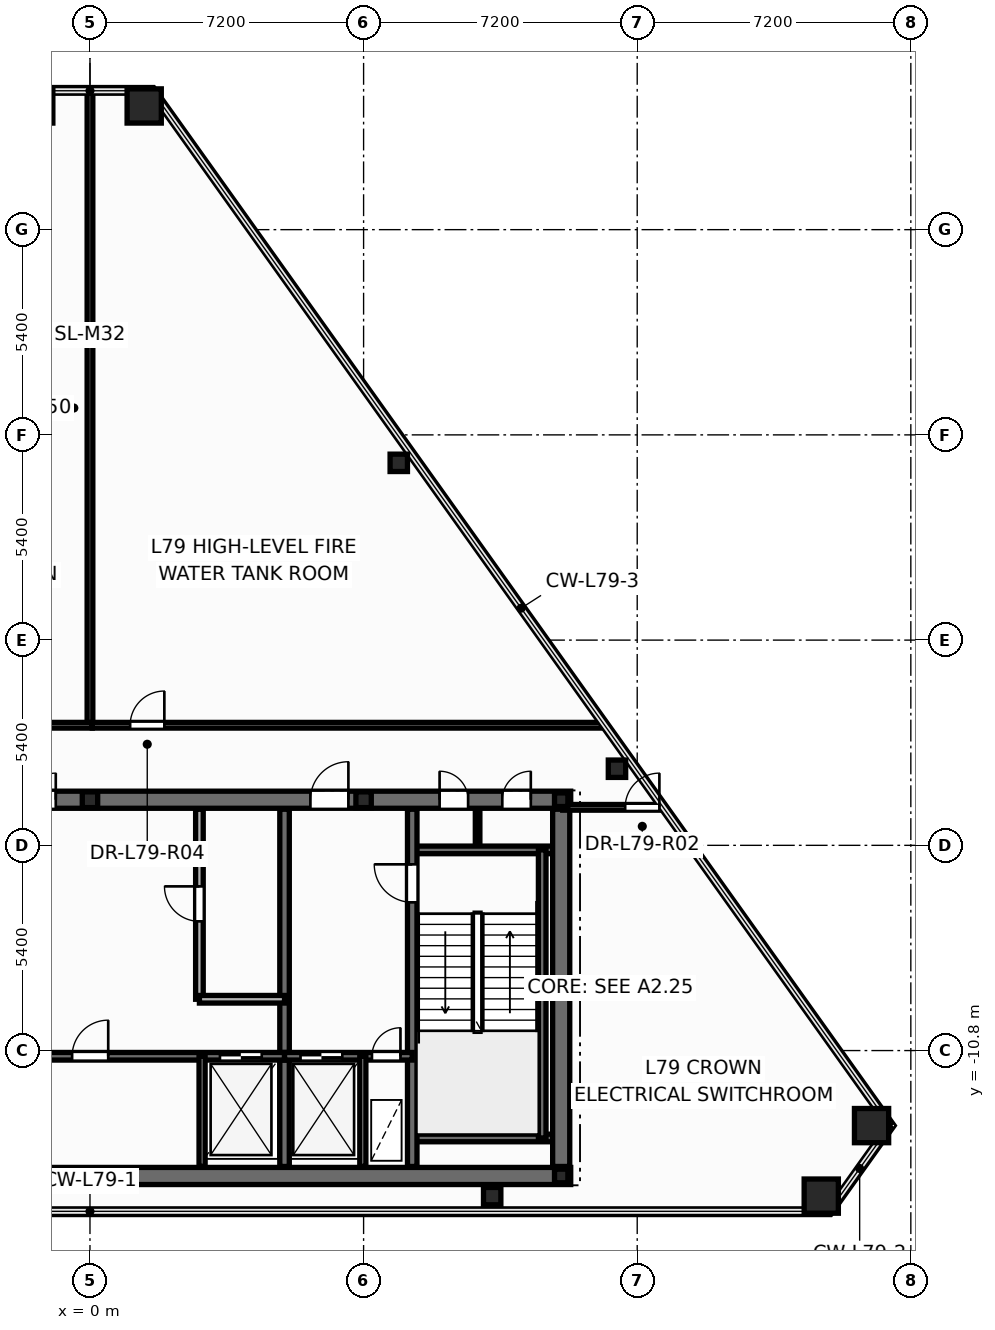
"""IFC4 building model, lengths in metres.
Left out: names, types, materials, properties, quantities, classifications, styles, units other than length and angle.
Written with IfcOpenShell. Run it as: python <this file> out.ifc"""

import sys

from ifc_helpers import new_model, si_unit, direction, frame, frame_2d, origin, origin_2d, place, context, subcontext, project, spatial, rectangle, hollow_rectangle, hollow_circle, i_section, extrude, element, fill, save


model = new_model("IFC4")
c1 = context("Model", 3, precision=1e-05, world=origin(), true_north=direction((0.0, 1.0)))
c2 = subcontext(c1, "Body", "Model", "MODEL_VIEW")
j1 = project(units=[si_unit("LENGTHUNIT", "METRE"), si_unit("PLANEANGLEUNIT", "RADIAN")], contexts=[c1])
p1 = place(None, origin())
s1 = spatial("IfcSite", under=j1, at=p1, CompositionType="ELEMENT")
p2 = place(p1, origin())
s2 = spatial("IfcBuilding", under=s1, at=p2, CompositionType="ELEMENT")
p3 = place(p2, frame((0.0, 0.0, 301.8)))
s3 = spatial("IfcBuildingStorey", under=s2, at=p3, CompositionType="ELEMENT", Elevation=301.8)
for number, where, z_axis, x_axis in (
    (1, (19.243, -14.63, 0.0), (0.0, 0.0, 1.0), (1.0, 0.0, 0.0)),
    (2, (20.567, -12.775, 0.0), (0.0, 0.0, 1.0), (1.0, 0.0, 0.0)),
    (3, (1.427, 14.055, 0.0), (0.0, 0.0, 1.0), (1.0, 0.0, 0.0)),
    (4, (-1.427, 14.055, 0.0), (0.0, 0.0, 1.0), (1.0, 0.0, 0.0)),
):
    element("IfcColumn", number, at=place(p3, frame(where, z_axis=z_axis, x_axis=x_axis)), inside=s3, PredefinedType="COLUMN", context=c2, shape_type="SweptSolid", body=[
        extrude(hollow_rectangle(XDim=0.9, YDim=0.9, WallThickness=0.04, at=origin_2d()), origin(), (0.0, 0.0, 1.0), 4.2),
    ])
for number, where, z_axis, x_axis in (
    (5, (10.583, -14.63, 0.0), (0.0, 0.0, 1.0), (1.0, 0.0, 0.0)),
    (6, (13.868, -3.385, 0.0), (0.0, 0.0, 1.0), (1.0, 0.0, 0.0)),
    (7, (8.126, 4.664, 0.0), (0.0, 0.0, 1.0), (1.0, 0.0, 0.0)),
):
    element("IfcColumn", number, at=place(p3, frame(where, z_axis=z_axis, x_axis=x_axis)), inside=s3, PredefinedType="COLUMN", context=c2, shape_type="SweptSolid", body=[
        extrude(hollow_circle(Radius=0.229, WallThickness=0.016, at=origin_2d()), origin(), (0.0, 0.0, 1.0), 4.2),
    ])
for number, where, z_axis, x_axis in (
    (8, (12.4, -14.1, 0.0), (0.0, 0.0, 1.0), (1.0, 0.0, 0.0)),
    (9, (12.4, -4.2, 0.0), (0.0, 0.0, 1.0), (1.0, 0.0, 0.0)),
):
    element("IfcColumn", number, at=place(p3, frame(where, z_axis=z_axis, x_axis=x_axis)), inside=s3, PredefinedType="COLUMN", context=c2, shape_type="SweptSolid", body=[
        extrude(i_section(OverallWidth=0.352, OverallDepth=0.359, WebThickness=0.018, FlangeThickness=0.026, at=origin_2d()), origin(), (0.0, 0.0, 1.0), 4.2),
    ])
for number, where, z_axis, x_axis in (
    (10, (0.0, -4.2, 0.0), (0.0, 0.0, 1.0), (1.0, 0.0, 0.0)),
    (11, (7.2, -4.2, 0.0), (0.0, 0.0, 1.0), (1.0, 0.0, 0.0)),
):
    element("IfcColumn", number, at=place(p3, frame(where, z_axis=z_axis, x_axis=x_axis)), inside=s3, PredefinedType="PILASTER", context=c2, shape_type="SweptSolid", body=[
        extrude(i_section(OverallWidth=0.405, OverallDepth=0.414, WebThickness=0.022, FlangeThickness=0.032, at=origin_2d()), origin(), (0.0, 0.0, 1.0), 4.2),
    ])
p4 = place(p3, frame((10.2, -5.52, 0.0), z_axis=(0.0, 0.0, 1.0), x_axis=(0.0, 1.0, 0.0)))
e12 = element("IfcWall", 12, at=p4, inside=s3, PredefinedType="PARTITIONING", context=c2, shape_type="SweptSolid", body=[
    extrude(rectangle(XDim=1.12, YDim=0.12, at=frame_2d((0.56, 0.0))), origin(), (0.0, 0.0, 1.0), 3.88),
])
p5 = place(p3, frame((-12.65, -14.1, 0.0), z_axis=(0.0, 0.0, 1.0), x_axis=(1.0, 0.0, 0.0)))
e13 = element("IfcWall", 13, at=p5, inside=s3, PredefinedType="SHEAR", context=c2, shape_type="SweptSolid", body=[
    extrude(rectangle(XDim=25.3, YDim=0.45, at=frame_2d((12.65, 0.0))), origin(), (0.0, 0.0, 1.0), 4.2),
])
p6 = place(p3, frame((-12.65, -4.2, 0.0), z_axis=(0.0, 0.0, 1.0), x_axis=(1.0, 0.0, 0.0)))
e14 = element("IfcWall", 14, at=p6, inside=s3, PredefinedType="SHEAR", context=c2, shape_type="SweptSolid", body=[
    extrude(rectangle(XDim=25.3, YDim=0.45, at=frame_2d((12.65, 0.0))), origin(), (0.0, 0.0, 1.0), 4.2),
])
p7 = place(p6, frame((1.85, 0.0, 0.0)))
e15 = element("IfcOpeningElement", 15, at=p7, cuts=e14, PredefinedType="OPENING", context=c2, shape_type="SweptSolid", body=[
    extrude(rectangle(XDim=0.756, YDim=2.054, at=frame_2d((0.375, 1.027))), frame((0.0, 0.235, 0.0), z_axis=(0.0, -1.0, 0.0), x_axis=(1.0, 0.0, 0.0)), (0.0, 0.0, 1.0), 0.47),
])
p8 = place(p6, frame((21.85, 0.0, 0.0)))
e16 = element("IfcOpeningElement", 16, at=p8, cuts=e14, PredefinedType="OPENING", context=c2, shape_type="SweptSolid", body=[
    extrude(rectangle(XDim=0.756, YDim=2.054, at=frame_2d((0.375, 1.027))), frame((0.0, 0.235, 0.0), z_axis=(0.0, -1.0, 0.0), x_axis=(1.0, 0.0, 0.0)), (0.0, 0.0, 1.0), 0.47),
])
p9 = place(p6, frame((23.5, 0.0, 0.0)))
e17 = element("IfcOpeningElement", 17, at=p9, cuts=e14, PredefinedType="OPENING", context=c2, shape_type="SweptSolid", body=[
    extrude(rectangle(XDim=0.756, YDim=2.054, at=frame_2d((0.375, 1.027))), frame((0.0, 0.235, 0.0), z_axis=(0.0, -1.0, 0.0), x_axis=(1.0, 0.0, 0.0)), (0.0, 0.0, 1.0), 0.47),
])
p10 = place(p6, frame((5.85, 0.0, 0.0)))
e18 = element("IfcOpeningElement", 18, at=p10, cuts=e14, PredefinedType="OPENING", context=c2, shape_type="SweptSolid", body=[
    extrude(rectangle(XDim=1.006, YDim=2.104, at=frame_2d((0.5, 1.052))), frame((0.0, 0.235, 0.0), z_axis=(0.0, -1.0, 0.0), x_axis=(1.0, 0.0, 0.0)), (0.0, 0.0, 1.0), 0.47),
])
p11 = place(p6, frame((10.35, 0.0, 0.0)))
e19 = element("IfcOpeningElement", 19, at=p11, cuts=e14, PredefinedType="OPENING", context=c2, shape_type="SweptSolid", body=[
    extrude(rectangle(XDim=1.406, YDim=2.154, at=frame_2d((0.7, 1.077))), frame((0.0, 0.235, 0.0), z_axis=(0.0, -1.0, 0.0), x_axis=(1.0, 0.0, 0.0)), (0.0, 0.0, 1.0), 0.47),
])
p12 = place(p6, frame((18.45, 0.0, 0.0)))
e20 = element("IfcOpeningElement", 20, at=p12, cuts=e14, PredefinedType="OPENING", context=c2, shape_type="SweptSolid", body=[
    extrude(rectangle(XDim=1.006, YDim=2.104, at=frame_2d((0.5, 1.052))), frame((0.0, 0.235, 0.0), z_axis=(0.0, -1.0, 0.0), x_axis=(1.0, 0.0, 0.0)), (0.0, 0.0, 1.0), 0.47),
])
for number, where, z_axis, x_axis in (
    (21, (8.48, -5.52, 0.0), (0.0, 0.0, 1.0), (1.0, 0.0, 0.0)),
    (22, (8.48, -13.1, 0.0), (0.0, 0.0, 1.0), (1.0, 0.0, 0.0)),
):
    element("IfcWall", number, at=place(p3, frame(where, z_axis=z_axis, x_axis=x_axis)), inside=s3, PredefinedType="SOLIDWALL", context=c2, shape_type="SweptSolid", body=[
        extrude(rectangle(XDim=3.87, YDim=0.2, at=frame_2d((1.935, 0.0))), origin(), (0.0, 0.0, 1.0), 4.2),
    ])
p13 = place(p3, frame((11.9, -13.1, 0.0), z_axis=(0.0, 0.0, 1.0), x_axis=(0.0, 1.0, 0.0)))
e23 = element("IfcWall", 23, at=p13, inside=s3, PredefinedType="SOLIDWALL", context=c2, shape_type="SweptSolid", body=[
    extrude(rectangle(XDim=7.58, YDim=0.2, at=frame_2d((3.79, 0.0))), origin(), (0.0, 0.0, 1.0), 4.2),
])
p14 = place(p3, frame((8.48, -13.85, 0.0), z_axis=(0.0, 0.0, 1.0), x_axis=(0.0, 1.0, 0.0)))
e24 = element("IfcWall", 24, at=p14, inside=s3, PredefinedType="SHEAR", context=c2, shape_type="SweptSolid", body=[
    extrude(rectangle(XDim=9.4, YDim=0.25, at=frame_2d((4.7, 0.0))), origin(), (0.0, 0.0, 1.0), 4.2),
])
p15 = place(p14, frame((6.95, 0.0, 0.0)))
e25 = element("IfcOpeningElement", 25, at=p15, cuts=e24, PredefinedType="OPENING", context=c2, shape_type="SweptSolid", body=[
    extrude(rectangle(XDim=1.006, YDim=2.104, at=frame_2d((0.5, 1.052))), frame((0.0, 0.135, 0.0), z_axis=(0.0, -1.0, 0.0), x_axis=(1.0, 0.0, 0.0)), (0.0, 0.0, 1.0), 0.27),
])
p16 = place(p3, frame((5.12, -13.85, 0.0), z_axis=(0.0, 0.0, 1.0), x_axis=(0.0, 1.0, 0.0)))
e26 = element("IfcWall", 26, at=p16, inside=s3, PredefinedType="SHEAR", context=c2, shape_type="SweptSolid", body=[
    extrude(rectangle(XDim=9.4, YDim=0.25, at=frame_2d((4.7, 0.0))), origin(), (0.0, 0.0, 1.0), 4.2),
])
p17 = place(p3, frame((-5.12, -10.95, 0.0), z_axis=(0.0, 0.0, 1.0), x_axis=(1.0, 0.0, 0.0)))
e27 = element("IfcWall", 27, at=p17, inside=s3, PredefinedType="SOLIDWALL", context=c2, shape_type="SweptSolid", body=[
    extrude(rectangle(XDim=10.24, YDim=0.2, at=frame_2d((5.12, 0.0))), origin(), (0.0, 0.0, 1.0), 4.2),
])
p18 = place(p17, frame((0.7, 0.0, 0.0)))
e28 = element("IfcOpeningElement", 28, at=p18, cuts=e27, PredefinedType="OPENING", context=c2, shape_type="SweptSolid", body=[
    extrude(rectangle(XDim=0.856, YDim=2.054, at=frame_2d((0.425, 1.027))), frame((0.0, 0.11, 0.0), z_axis=(0.0, -1.0, 0.0), x_axis=(1.0, 0.0, 0.0)), (0.0, 0.0, 1.0), 0.22),
])
p19 = place(p17, frame((4.65, 0.0, 0.0)))
e29 = element("IfcOpeningElement", 29, at=p19, cuts=e27, PredefinedType="OPENING", context=c2, shape_type="SweptSolid", body=[
    extrude(rectangle(XDim=0.956, YDim=2.104, at=frame_2d((0.475, 1.052))), frame((0.0, 0.11, 0.0), z_axis=(0.0, -1.0, 0.0), x_axis=(1.0, 0.0, 0.0)), (0.0, 0.0, 1.0), 0.22),
])
p20 = place(p17, frame((8.54, 0.0, 0.0)))
e30 = element("IfcOpeningElement", 30, at=p20, cuts=e27, PredefinedType="OPENING", context=c2, shape_type="SweptSolid", body=[
    extrude(rectangle(XDim=1.106, YDim=2.104, at=frame_2d((0.55, 1.052))), frame((0.0, 0.11, 0.0), z_axis=(0.0, -1.0, 0.0), x_axis=(1.0, 0.0, 0.0)), (0.0, 0.0, 1.0), 0.22),
])
p21 = place(p3, frame((5.12, -10.95, 0.0), z_axis=(0.0, 0.0, 1.0), x_axis=(1.0, 0.0, 0.0)))
e31 = element("IfcWall", 31, at=p21, inside=s3, PredefinedType="SOLIDWALL", context=c2, shape_type="SweptSolid", body=[
    extrude(rectangle(XDim=3.36, YDim=0.2, at=frame_2d((1.68, 0.0))), origin(), (0.0, 0.0, 1.0), 4.2),
])
p22 = place(p21, frame((0.42, 0.0, 0.0)))
e32 = element("IfcOpeningElement", 32, at=p22, cuts=e31, PredefinedType="OPENING", context=c2, shape_type="SweptSolid", body=[
    extrude(rectangle(XDim=1.106, YDim=2.104, at=frame_2d((0.55, 1.052))), frame((0.0, 0.11, 0.0), z_axis=(0.0, -1.0, 0.0), x_axis=(1.0, 0.0, 0.0)), (0.0, 0.0, 1.0), 0.22),
])
p23 = place(p21, frame((2.3, 0.0, 0.0)))
e33 = element("IfcOpeningElement", 33, at=p23, cuts=e31, PredefinedType="OPENING", context=c2, shape_type="SweptSolid", body=[
    extrude(rectangle(XDim=0.756, YDim=2.054, at=frame_2d((0.375, 1.027))), frame((0.0, 0.11, 0.0), z_axis=(0.0, -1.0, 0.0), x_axis=(1.0, 0.0, 0.0)), (0.0, 0.0, 1.0), 0.22),
])
for number, where, z_axis, x_axis in (
    (34, (7.18, -13.85, 0.0), (0.0, 0.0, 1.0), (0.0, 1.0, 0.0)),
    (35, (2.95, -13.85, 0.0), (0.0, 0.0, 1.0), (0.0, 1.0, 0.0)),
):
    element("IfcWall", number, at=place(p3, frame(where, z_axis=z_axis, x_axis=x_axis)), inside=s3, PredefinedType="PARTITIONING", context=c2, shape_type="SweptSolid", body=[
        extrude(rectangle(XDim=2.9, YDim=0.16, at=frame_2d((1.45, 0.0))), origin(), (0.0, 0.0, 1.0), 3.105),
    ])
p24 = place(p3, frame((12.4, -13.85, 0.0), z_axis=(0.0, 0.0, 1.0), x_axis=(0.0, 1.0, 0.0)))
e36 = element("IfcWall", 36, at=p24, inside=s3, PredefinedType="SHEAR", context=c2, shape_type="SweptSolid", body=[
    extrude(rectangle(XDim=9.4, YDim=0.45, at=frame_2d((4.7, 0.0))), origin(), (0.0, 0.0, 1.0), 4.2),
])
p25 = place(p3, frame((2.88, -9.45, 0.0), z_axis=(0.0, 0.0, 1.0), x_axis=(0.0, 1.0, 0.0)))
e37 = element("IfcWall", 37, at=p25, inside=s3, PredefinedType="SOLIDWALL", context=c2, shape_type="SweptSolid", body=[
    extrude(rectangle(XDim=5.0, YDim=0.2, at=frame_2d((2.5, 0.0))), origin(), (0.0, 0.0, 1.0), 3.88),
])
p26 = place(p25, frame((2.05, 0.0, 0.0)))
e38 = element("IfcOpeningElement", 38, at=p26, cuts=e37, PredefinedType="OPENING", context=c2, shape_type="SweptSolid", body=[
    extrude(rectangle(XDim=0.926, YDim=2.104, at=frame_2d((0.46, 1.052))), frame((0.0, 0.11, 0.0), z_axis=(0.0, -1.0, 0.0), x_axis=(1.0, 0.0, 0.0)), (0.0, 0.0, 1.0), 0.22),
])
p27 = place(p3, frame((2.88, -9.45, 0.0), z_axis=(0.0, 0.0, 1.0), x_axis=(1.0, 0.0, 0.0)))
e39 = element("IfcWall", 39, at=p27, inside=s3, PredefinedType="SOLIDWALL", context=c2, shape_type="SweptSolid", body=[
    extrude(rectangle(XDim=2.24, YDim=0.2, at=frame_2d((1.12, 0.0))), origin(), (0.0, 0.0, 1.0), 3.88),
])
p28 = place(p3, frame((0.0, -2.24, 0.0), z_axis=(0.0, 0.0, 1.0), x_axis=(0.0, 1.0, 0.0)))
e40 = element("IfcWall", 40, at=p28, inside=s3, PredefinedType="PARTITIONING", context=c2, shape_type="SweptSolid", body=[
    extrude(rectangle(XDim=16.695, YDim=0.15, at=frame_2d((8.347, 0.0))), origin(), (0.0, 0.0, 1.0), 2.855),
])
p29 = place(p3, frame((-13.543, -2.24, 0.0), z_axis=(0.0, 0.0, 1.0), x_axis=(1.0, 0.0, 0.0)))
e41 = element("IfcWall", 41, at=p29, inside=s3, PredefinedType="PARTITIONING", context=c2, shape_type="SweptSolid", body=[
    extrude(rectangle(XDim=13.603, YDim=0.15, at=frame_2d((6.801, 0.0))), origin(), (0.0, 0.0, 1.0), 2.855),
])
p30 = place(p29, frame((2.134, 0.0, 0.0)))
e42 = element("IfcOpeningElement", 42, at=p30, cuts=e41, PredefinedType="OPENING", context=c2, shape_type="SweptSolid", body=[
    extrude(rectangle(XDim=0.906, YDim=2.104, at=frame_2d((0.45, 1.052))), frame((0.0, 0.085, 0.0), z_axis=(0.0, -1.0, 0.0), x_axis=(1.0, 0.0, 0.0)), (0.0, 0.0, 1.0), 0.17),
])
p31 = place(p3, frame((0.062, -2.24, 0.0), z_axis=(0.0, 0.0, 1.0), x_axis=(1.0, 0.0, 0.0)))
e43 = element("IfcWall", 43, at=p31, inside=s3, PredefinedType="PARTITIONING", context=c2, shape_type="SweptSolid", body=[
    extrude(rectangle(XDim=13.481, YDim=0.15, at=frame_2d((6.74, 0.0))), origin(), (0.0, 0.0, 1.0), 2.855),
])
p32 = place(p31, frame((0.995, 0.0, 0.0)))
e44 = element("IfcOpeningElement", 44, at=p32, cuts=e43, PredefinedType="OPENING", context=c2, shape_type="SweptSolid", body=[
    extrude(rectangle(XDim=0.906, YDim=2.104, at=frame_2d((0.45, 1.052))), frame((0.0, 0.085, 0.0), z_axis=(0.0, -1.0, 0.0), x_axis=(1.0, 0.0, 0.0)), (0.0, 0.0, 1.0), 0.17),
])
p33 = place(p3, frame((12.44, -4.4, 0.0), z_axis=(0.0, 0.0, 1.0), x_axis=(1.0, 0.0, 0.0)))
e45 = element("IfcWall", 45, at=p33, inside=s3, PredefinedType="PARTITIONING", context=c2, shape_type="SweptSolid", body=[
    extrude(rectangle(XDim=2.644, YDim=0.15, at=frame_2d((1.322, 0.0))), origin(), (0.0, 0.0, 1.0), 2.855),
])
p34 = place(p33, frame((1.644, 0.0, 0.0)))
e46 = element("IfcOpeningElement", 46, at=p34, cuts=e45, PredefinedType="OPENING", context=c2, shape_type="SweptSolid", body=[
    extrude(rectangle(XDim=0.906, YDim=2.104, at=frame_2d((0.45, 1.052))), frame((0.0, 0.085, 0.0), z_axis=(0.0, -1.0, 0.0), x_axis=(1.0, 0.0, 0.0)), (0.0, 0.0, 1.0), 0.17),
])
p35 = place(p26, origin())
e47 = element("IfcDoor", 47, at=p35, inside=s3, OperationType="SINGLE_SWING_RIGHT", PredefinedType="DOOR", context=c2, shape_type="SweptSolid", body=[
    extrude(rectangle(XDim=0.92, YDim=2.1, at=frame_2d((0.46, 1.05))), frame((0.0, 0.025, 0.0), z_axis=(0.0, -1.0, 0.0), x_axis=(1.0, 0.0, 0.0)), (0.0, 0.0, 1.0), 0.05),
])
fill(e38, e47)
p36 = place(p15, origin())
e48 = element("IfcDoor", 48, at=p36, inside=s3, OperationType="SINGLE_SWING_RIGHT", PredefinedType="DOOR", context=c2, shape_type="SweptSolid", body=[
    extrude(rectangle(XDim=1.0, YDim=2.1, at=frame_2d((0.5, 1.05))), frame((0.0, 0.025, 0.0), z_axis=(0.0, -1.0, 0.0), x_axis=(1.0, 0.0, 0.0)), (0.0, 0.0, 1.0), 0.05),
])
fill(e25, e48)
p37 = place(p22, origin())
e49 = element("IfcDoor", 49, at=p37, inside=s3, OperationType="DOUBLE_DOOR_SLIDING", PredefinedType="DOOR", context=c2, shape_type="SweptSolid", body=[
    extrude(rectangle(XDim=1.1, YDim=2.1, at=frame_2d((0.55, 1.05))), frame((0.0, 0.025, 0.0), z_axis=(0.0, -1.0, 0.0), x_axis=(1.0, 0.0, 0.0)), (0.0, 0.0, 1.0), 0.05),
])
fill(e32, e49)
p38 = place(p23, origin())
e50 = element("IfcDoor", 50, at=p38, inside=s3, OperationType="SINGLE_SWING_RIGHT", PredefinedType="DOOR", context=c2, shape_type="SweptSolid", body=[
    extrude(rectangle(XDim=0.75, YDim=2.05, at=frame_2d((0.375, 1.025))), frame((0.0, 0.025, 0.0), z_axis=(0.0, -1.0, 0.0), x_axis=(1.0, 0.0, 0.0)), (0.0, 0.0, 1.0), 0.05),
])
fill(e33, e50)
p39 = place(p19, origin())
e51 = element("IfcDoor", 51, at=p39, inside=s3, OperationType="SINGLE_SWING_RIGHT", PredefinedType="DOOR", context=c2, shape_type="SweptSolid", body=[
    extrude(rectangle(XDim=0.95, YDim=2.1, at=frame_2d((0.475, 1.05))), frame((0.0, 0.025, 0.0), z_axis=(0.0, -1.0, 0.0), x_axis=(1.0, 0.0, 0.0)), (0.0, 0.0, 1.0), 0.05),
])
fill(e29, e51)
p40 = place(p20, origin())
e52 = element("IfcDoor", 52, at=p40, inside=s3, OperationType="DOUBLE_DOOR_SLIDING", PredefinedType="DOOR", context=c2, shape_type="SweptSolid", body=[
    extrude(rectangle(XDim=1.1, YDim=2.1, at=frame_2d((0.55, 1.05))), frame((0.0, 0.025, 0.0), z_axis=(0.0, -1.0, 0.0), x_axis=(1.0, 0.0, 0.0)), (0.0, 0.0, 1.0), 0.05),
])
fill(e30, e52)
p41 = place(p8, origin())
e53 = element("IfcDoor", 53, at=p41, inside=s3, OperationType="SINGLE_SWING_LEFT", PredefinedType="DOOR", context=c2, shape_type="SweptSolid", body=[
    extrude(rectangle(XDim=0.75, YDim=2.05, at=frame_2d((0.375, 1.025))), frame((0.0, 0.025, 0.0), z_axis=(0.0, -1.0, 0.0), x_axis=(1.0, 0.0, 0.0)), (0.0, 0.0, 1.0), 0.05),
])
fill(e16, e53)
p42 = place(p9, origin())
e54 = element("IfcDoor", 54, at=p42, inside=s3, OperationType="SINGLE_SWING_RIGHT", PredefinedType="DOOR", context=c2, shape_type="SweptSolid", body=[
    extrude(rectangle(XDim=0.75, YDim=2.05, at=frame_2d((0.375, 1.025))), frame((0.0, 0.025, 0.0), z_axis=(0.0, -1.0, 0.0), x_axis=(1.0, 0.0, 0.0)), (0.0, 0.0, 1.0), 0.05),
])
fill(e17, e54)
p43 = place(p11, origin())
e55 = element("IfcDoor", 55, at=p43, inside=s3, OperationType="DOUBLE_DOOR_SINGLE_SWING", PredefinedType="DOOR", context=c2, shape_type="SweptSolid", body=[
    extrude(rectangle(XDim=1.4, YDim=2.15, at=frame_2d((0.7, 1.075))), frame((0.0, 0.025, 0.0), z_axis=(0.0, -1.0, 0.0), x_axis=(1.0, 0.0, 0.0)), (0.0, 0.0, 1.0), 0.05),
])
fill(e19, e55)
p44 = place(p12, origin())
e56 = element("IfcDoor", 56, at=p44, inside=s3, OperationType="SINGLE_SWING_RIGHT", PredefinedType="DOOR", context=c2, shape_type="SweptSolid", body=[
    extrude(rectangle(XDim=1.0, YDim=2.1, at=frame_2d((0.5, 1.05))), frame((0.0, 0.025, 0.0), z_axis=(0.0, -1.0, 0.0), x_axis=(1.0, 0.0, 0.0)), (0.0, 0.0, 1.0), 0.05),
])
fill(e20, e56)
p45 = place(p34, origin())
e57 = element("IfcDoor", 57, at=p45, inside=s3, OperationType="SINGLE_SWING_RIGHT", PredefinedType="DOOR", context=c2, shape_type="SweptSolid", body=[
    extrude(rectangle(XDim=0.9, YDim=2.1, at=frame_2d((0.45, 1.05))), frame((0.0, 0.025, 0.0), z_axis=(0.0, -1.0, 0.0), x_axis=(1.0, 0.0, 0.0)), (0.0, 0.0, 1.0), 0.05),
])
fill(e46, e57)
p46 = place(p32, origin())
e58 = element("IfcDoor", 58, at=p46, inside=s3, OperationType="SINGLE_SWING_RIGHT", PredefinedType="DOOR", context=c2, shape_type="SweptSolid", body=[
    extrude(rectangle(XDim=0.9, YDim=2.1, at=frame_2d((0.45, 1.05))), frame((0.0, 0.025, 0.0), z_axis=(0.0, -1.0, 0.0), x_axis=(1.0, 0.0, 0.0)), (0.0, 0.0, 1.0), 0.05),
])
fill(e44, e58)
save(model, sys.argv[1])
